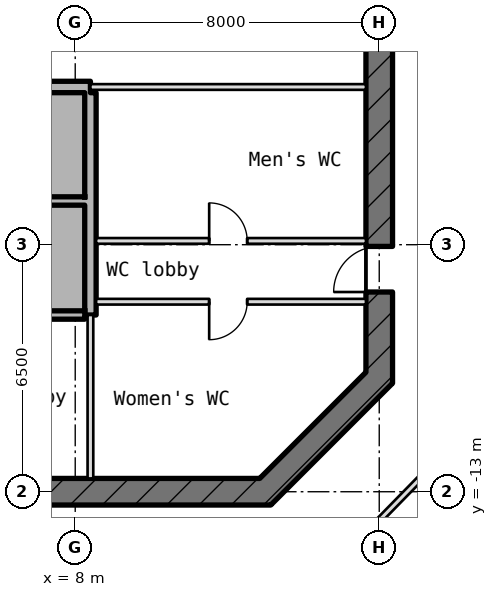
"""IFC4 building model, lengths in metres.
Left out: names, types, materials, properties, quantities, classifications, styles, units other than length and angle.
Written with IfcOpenShell. Run it as: python <this file> out.ifc"""

import sys

from ifc_helpers import new_model, si_unit, direction, frame, frame_2d, origin, place, context, subcontext, project, spatial, rectangle, extrude, element, fill, save


model = new_model("IFC4")
c1 = context("Model", 3, precision=1e-05, world=origin(), true_north=direction((0.0, 1.0)))
c2 = subcontext(c1, "Body", "Model", "MODEL_VIEW")
j1 = project(units=[si_unit("LENGTHUNIT", "METRE"), si_unit("PLANEANGLEUNIT", "RADIAN")], contexts=[c1])
p1 = place(None, origin())
s1 = spatial("IfcSite", under=j1, at=p1, CompositionType="ELEMENT")
p2 = place(p1, origin())
s2 = spatial("IfcBuilding", under=s1, at=p2, CompositionType="ELEMENT")
p3 = place(p2, frame((0.0, 0.0, 384.1)))
s3 = spatial("IfcBuildingStorey", under=s2, at=p3, CompositionType="ELEMENT", Elevation=384.1)
p4 = place(p3, frame((12.897, -13.103, -0.18), z_axis=(0.0, 0.0, 1.0), x_axis=(0.707106781187, 0.707106781187, 0.0)))
e1 = element("IfcWall", 1, at=p4, inside=s3, PredefinedType="SHEAR", context=c2, shape_type="SweptSolid", body=[
    extrude(rectangle(XDim=4.533, YDim=0.7, at=frame_2d((2.266, 0.0))), origin(), (0.0, 0.0, 1.0), 4.15),
])
p5 = place(p3, frame((16.0, -10.145, -0.18), z_axis=(0.0, 0.0, 1.0), x_axis=(0.0, 1.0, 0.0)))
e2 = element("IfcWall", 2, at=p5, inside=s3, PredefinedType="SHEAR", context=c2, shape_type="SweptSolid", body=[
    extrude(rectangle(XDim=20.29, YDim=0.7, at=frame_2d((10.145, 0.0))), origin(), (0.0, 0.0, 1.0), 4.15),
])
p6 = place(p5, frame((8.945, 0.0, 0.18)))
e3 = element("IfcOpeningElement", 3, at=p6, cuts=e2, PredefinedType="OPENING", context=c2, shape_type="SweptSolid", body=[
    extrude(rectangle(XDim=2.4, YDim=2.1, at=frame_2d((1.2, 1.05))), frame((0.0, 0.36, 0.0), z_axis=(0.0, -1.0, 0.0), x_axis=(1.0, 0.0, 0.0)), (0.0, 0.0, 1.0), 0.72),
])
p7 = place(p5, frame((13.545, 0.0, 0.18)))
e4 = element("IfcOpeningElement", 4, at=p7, cuts=e2, PredefinedType="OPENING", context=c2, shape_type="SweptSolid", body=[
    extrude(rectangle(XDim=1.2, YDim=2.1, at=frame_2d((0.6, 1.05))), frame((0.0, 0.36, 0.0), z_axis=(0.0, -1.0, 0.0), x_axis=(1.0, 0.0, 0.0)), (0.0, 0.0, 1.0), 0.72),
])
p8 = place(p5, frame((2.4, 0.0, 0.18)))
e5 = element("IfcOpeningElement", 5, at=p8, cuts=e2, PredefinedType="OPENING", context=c2, shape_type="SweptSolid", body=[
    extrude(rectangle(XDim=1.2, YDim=2.1, at=frame_2d((0.6, 1.05))), frame((0.0, 0.36, 0.0), z_axis=(0.0, -1.0, 0.0), x_axis=(1.0, 0.0, 0.0)), (0.0, 0.0, 1.0), 0.72),
])
p9 = place(p3, frame((-13.145, -13.0, -0.18), z_axis=(0.0, 0.0, 1.0), x_axis=(1.0, 0.0, 0.0)))
e6 = element("IfcWall", 6, at=p9, inside=s3, PredefinedType="SHEAR", context=c2, shape_type="SweptSolid", body=[
    extrude(rectangle(XDim=26.29, YDim=0.7, at=frame_2d((13.145, 0.0))), origin(), (0.0, 0.0, 1.0), 4.15),
])
p10 = place(p9, frame((2.845, 0.0, 0.18)))
e7 = element("IfcOpeningElement", 7, at=p10, cuts=e6, PredefinedType="OPENING", context=c2, shape_type="SweptSolid", body=[
    extrude(rectangle(XDim=1.2, YDim=2.1, at=frame_2d((0.6, 1.05))), frame((0.0, 0.36, 0.0), z_axis=(0.0, -1.0, 0.0), x_axis=(1.0, 0.0, 0.0)), (0.0, 0.0, 1.0), 0.72),
])
p11 = place(p9, frame((6.845, 0.0, 0.18)))
e8 = element("IfcOpeningElement", 8, at=p11, cuts=e6, PredefinedType="OPENING", context=c2, shape_type="SweptSolid", body=[
    extrude(rectangle(XDim=1.4, YDim=2.1, at=frame_2d((0.7, 1.05))), frame((0.0, 0.36, 0.0), z_axis=(0.0, -1.0, 0.0), x_axis=(1.0, 0.0, 0.0)), (0.0, 0.0, 1.0), 0.72),
])
p12 = place(p9, frame((15.445, 0.0, 0.18)))
e9 = element("IfcOpeningElement", 9, at=p12, cuts=e6, PredefinedType="OPENING", context=c2, shape_type="SweptSolid", body=[
    extrude(rectangle(XDim=1.4, YDim=2.1, at=frame_2d((0.7, 1.05))), frame((0.0, 0.36, 0.0), z_axis=(0.0, -1.0, 0.0), x_axis=(1.0, 0.0, 0.0)), (0.0, 0.0, 1.0), 0.72),
])
p13 = place(p3, frame((-2.69, -8.35, 0.0), z_axis=(0.0, 0.0, 1.0), x_axis=(1.0, 0.0, 0.0)))
e10 = element("IfcWall", 10, at=p13, inside=s3, PredefinedType="STANDARD", context=c2, shape_type="SweptSolid", body=[
    extrude(rectangle(XDim=10.94, YDim=0.22, at=frame_2d((5.47, 0.0))), origin(), (0.0, 0.0, 1.0), 3.97),
])
p14 = place(p13, frame((0.74, 0.0, 0.0)))
e11 = element("IfcOpeningElement", 11, at=p14, cuts=e10, PredefinedType="OPENING", context=c2, shape_type="SweptSolid", body=[
    extrude(rectangle(XDim=1.1, YDim=2.1, at=frame_2d((0.55, 1.05))), frame((0.0, 0.12, 0.0), z_axis=(0.0, -1.0, 0.0), x_axis=(1.0, 0.0, 0.0)), (0.0, 0.0, 1.0), 0.24),
])
p15 = place(p13, frame((3.54, 0.0, 0.0)))
e12 = element("IfcOpeningElement", 12, at=p15, cuts=e10, PredefinedType="OPENING", context=c2, shape_type="SweptSolid", body=[
    extrude(rectangle(XDim=1.1, YDim=2.1, at=frame_2d((0.55, 1.05))), frame((0.0, 0.12, 0.0), z_axis=(0.0, -1.0, 0.0), x_axis=(1.0, 0.0, 0.0)), (0.0, 0.0, 1.0), 0.24),
])
p16 = place(p3, frame((8.55, -8.0, 0.0), z_axis=(0.0, 0.0, 1.0), x_axis=(1.0, 0.0, 0.0)))
e13 = element("IfcWall", 13, at=p16, inside=s3, PredefinedType="PARTITIONING", context=c2, shape_type="SweptSolid", body=[
    extrude(rectangle(XDim=7.1, YDim=0.15, at=frame_2d((3.55, 0.0))), origin(), (0.0, 0.0, 1.0), 3.97),
])
p17 = place(p16, frame((2.975, 0.0, 0.0)))
e14 = element("IfcOpeningElement", 14, at=p17, cuts=e13, PredefinedType="OPENING", context=c2, shape_type="SweptSolid", body=[
    extrude(rectangle(XDim=1.0, YDim=2.1, at=frame_2d((0.5, 1.05))), frame((0.0, 0.085, 0.0), z_axis=(0.0, -1.0, 0.0), x_axis=(1.0, 0.0, 0.0)), (0.0, 0.0, 1.0), 0.17),
])
p18 = place(p3, frame((8.55, -6.4, 0.0), z_axis=(0.0, 0.0, 1.0), x_axis=(1.0, 0.0, 0.0)))
e15 = element("IfcWall", 15, at=p18, inside=s3, PredefinedType="PARTITIONING", context=c2, shape_type="SweptSolid", body=[
    extrude(rectangle(XDim=7.1, YDim=0.15, at=frame_2d((3.55, 0.0))), origin(), (0.0, 0.0, 1.0), 3.97),
])
p19 = place(p18, frame((2.975, 0.0, 0.0)))
e16 = element("IfcOpeningElement", 16, at=p19, cuts=e15, PredefinedType="OPENING", context=c2, shape_type="SweptSolid", body=[
    extrude(rectangle(XDim=1.0, YDim=2.1, at=frame_2d((0.5, 1.05))), frame((0.0, 0.085, 0.0), z_axis=(0.0, -1.0, 0.0), x_axis=(1.0, 0.0, 0.0)), (0.0, 0.0, 1.0), 0.17),
])
p20 = place(p3, frame((-8.25, -5.35, 0.0), z_axis=(0.0, 0.0, 1.0), x_axis=(1.0, 0.0, 0.0)))
e17 = element("IfcWall", 17, at=p20, inside=s3, PredefinedType="STANDARD", context=c2, shape_type="SweptSolid", body=[
    extrude(rectangle(XDim=16.5, YDim=0.22, at=frame_2d((8.25, 0.0))), origin(), (0.0, 0.0, 1.0), 3.97),
])
p21 = place(p3, frame((-8.4, -2.35, -0.18), z_axis=(0.0, 0.0, 1.0), x_axis=(1.0, 0.0, 0.0)))
e18 = element("IfcWall", 18, at=p21, inside=s3, PredefinedType="SHEAR", context=c2, shape_type="SweptSolid", body=[
    extrude(rectangle(XDim=16.8, YDim=0.3, at=frame_2d((8.4, 0.0))), origin(), (0.0, 0.0, 1.0), 4.15),
])
p22 = place(p21, frame((2.2, 0.0, 0.18)))
e19 = element("IfcOpeningElement", 19, at=p22, cuts=e18, PredefinedType="OPENING", context=c2, shape_type="SweptSolid", body=[
    extrude(rectangle(XDim=1.2, YDim=2.1, at=frame_2d((0.6, 1.05))), frame((0.0, 0.16, 0.0), z_axis=(0.0, -1.0, 0.0), x_axis=(1.0, 0.0, 0.0)), (0.0, 0.0, 1.0), 0.32),
])
p23 = place(p21, frame((5.0, 0.0, 0.18)))
e20 = element("IfcOpeningElement", 20, at=p23, cuts=e18, PredefinedType="OPENING", context=c2, shape_type="SweptSolid", body=[
    extrude(rectangle(XDim=1.2, YDim=2.1, at=frame_2d((0.6, 1.05))), frame((0.0, 0.16, 0.0), z_axis=(0.0, -1.0, 0.0), x_axis=(1.0, 0.0, 0.0)), (0.0, 0.0, 1.0), 0.32),
])
p24 = place(p21, frame((7.8, 0.0, 0.18)))
e21 = element("IfcOpeningElement", 21, at=p24, cuts=e18, PredefinedType="OPENING", context=c2, shape_type="SweptSolid", body=[
    extrude(rectangle(XDim=1.2, YDim=2.1, at=frame_2d((0.6, 1.05))), frame((0.0, 0.16, 0.0), z_axis=(0.0, -1.0, 0.0), x_axis=(1.0, 0.0, 0.0)), (0.0, 0.0, 1.0), 0.32),
])
p25 = place(p21, frame((10.6, 0.0, 0.18)))
e22 = element("IfcOpeningElement", 22, at=p25, cuts=e18, PredefinedType="OPENING", context=c2, shape_type="SweptSolid", body=[
    extrude(rectangle(XDim=1.2, YDim=2.1, at=frame_2d((0.6, 1.05))), frame((0.0, 0.16, 0.0), z_axis=(0.0, -1.0, 0.0), x_axis=(1.0, 0.0, 0.0)), (0.0, 0.0, 1.0), 0.32),
])
p26 = place(p21, frame((13.4, 0.0, 0.18)))
e23 = element("IfcOpeningElement", 23, at=p26, cuts=e18, PredefinedType="OPENING", context=c2, shape_type="SweptSolid", body=[
    extrude(rectangle(XDim=1.2, YDim=2.1, at=frame_2d((0.6, 1.05))), frame((0.0, 0.16, 0.0), z_axis=(0.0, -1.0, 0.0), x_axis=(1.0, 0.0, 0.0)), (0.0, 0.0, 1.0), 0.32),
])
p27 = place(p3, frame((8.4, -2.35, 0.0), z_axis=(0.0, 0.0, 1.0), x_axis=(1.0, 0.0, 0.0)))
e24 = element("IfcWall", 24, at=p27, inside=s3, PredefinedType="PARTITIONING", context=c2, shape_type="SweptSolid", body=[
    extrude(rectangle(XDim=7.25, YDim=0.15, at=frame_2d((3.625, 0.0))), origin(), (0.0, 0.0, 1.0), 3.97),
])
p28 = place(p3, frame((8.4, -12.65, 0.0), z_axis=(0.0, 0.0, 1.0), x_axis=(0.0, 1.0, 0.0)))
e25 = element("IfcWall", 25, at=p28, inside=s3, PredefinedType="PARTITIONING", context=c2, shape_type="SweptSolid", body=[
    extrude(rectangle(XDim=4.3, YDim=0.15, at=frame_2d((2.15, 0.0))), origin(), (0.0, 0.0, 1.0), 3.97),
])
p29 = place(p3, frame((8.4, -8.35, -0.18), z_axis=(0.0, 0.0, 1.0), x_axis=(0.0, 1.0, 0.0)))
e26 = element("IfcWall", 26, at=p29, inside=s3, PredefinedType="SHEAR", context=c2, shape_type="SweptSolid", body=[
    extrude(rectangle(XDim=5.85, YDim=0.3, at=frame_2d((2.925, 0.0))), origin(), (0.0, 0.0, 1.0), 4.15),
])
p30 = place(p3, frame((18.75, -10.94, 0.0), z_axis=(0.0, 0.0, 1.0), x_axis=(-0.699076809287, -0.715046582201, 0.0)))
e27 = element("IfcWall", 27, at=p30, inside=s3, PredefinedType="PARTITIONING", context=c2, shape_type="SweptSolid", body=[
    extrude(rectangle(XDim=6.727, YDim=0.15, at=frame_2d((3.363, 0.0))), origin(), (0.0, 0.0, 1.0), 3.97),
])
p31 = place(p19, origin())
e28 = element("IfcDoor", 28, at=p31, inside=s3, OperationType="SINGLE_SWING_RIGHT", PredefinedType="DOOR", context=c2, shape_type="SweptSolid", body=[
    extrude(rectangle(XDim=1.0, YDim=2.1, at=frame_2d((0.5, 1.05))), frame((0.0, 0.025, 0.0), z_axis=(0.0, -1.0, 0.0), x_axis=(1.0, 0.0, 0.0)), (0.0, 0.0, 1.0), 0.05),
])
fill(e16, e28)
p32 = place(p8, origin())
e29 = element("IfcDoor", 29, at=p32, inside=s3, OperationType="SINGLE_SWING_RIGHT", PredefinedType="DOOR", context=c2, shape_type="SweptSolid", body=[
    extrude(rectangle(XDim=1.2, YDim=2.1, at=frame_2d((0.6, 1.05))), frame((0.0, 0.025, 0.0), z_axis=(0.0, -1.0, 0.0), x_axis=(1.0, 0.0, 0.0)), (0.0, 0.0, 1.0), 0.05),
])
fill(e5, e29)
p33 = place(p17, frame((1.0, 0.0, 0.0), z_axis=(0.0, 0.0, 1.0), x_axis=(-1.0, 0.0, 0.0)))
e30 = element("IfcDoor", 30, at=p33, inside=s3, OperationType="SINGLE_SWING_LEFT", PredefinedType="DOOR", context=c2, shape_type="SweptSolid", body=[
    extrude(rectangle(XDim=1.0, YDim=2.1, at=frame_2d((0.5, 1.05))), frame((0.0, 0.025, 0.0), z_axis=(0.0, -1.0, 0.0), x_axis=(1.0, 0.0, 0.0)), (0.0, 0.0, 1.0), 0.05),
])
fill(e14, e30)
save(model, sys.argv[1])
